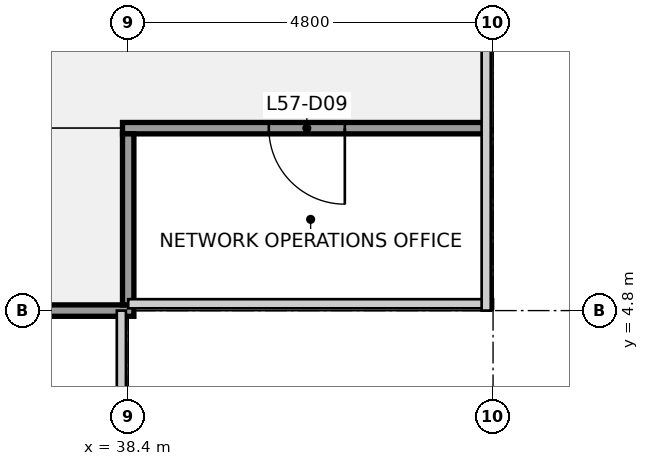
"""IFC4 building model, lengths in metres.
Left out: names, types, materials, properties, quantities, classifications, styles, units other than length and angle.
Written with IfcOpenShell. Run it as: python <this file> out.ifc"""

import sys

from ifc_helpers import new_model, si_unit, direction, frame, frame_2d, origin, place, context, subcontext, project, spatial, rectangle, extrude, element, fill, save


model = new_model("IFC4")
c1 = context("Model", 3, precision=1e-05, world=origin(), true_north=direction((0.0, 1.0)))
c2 = subcontext(c1, "Body", "Model", "MODEL_VIEW")
j1 = project(units=[si_unit("LENGTHUNIT", "METRE"), si_unit("PLANEANGLEUNIT", "RADIAN")], contexts=[c1])
p1 = place(None, origin())
s1 = spatial("IfcSite", under=j1, at=p1, CompositionType="ELEMENT")
p2 = place(p1, origin())
s2 = spatial("IfcBuilding", under=s1, at=p2, CompositionType="ELEMENT")
p3 = place(p2, frame((0.0, 0.0, 257.2)))
s3 = spatial("IfcBuildingStorey", under=s2, at=p3, CompositionType="ELEMENT", Elevation=257.2)
p4 = place(p3, frame((19.125, 4.8, 0.0), z_axis=(0.0, 0.0, 1.0), x_axis=(1.0, 0.0, 0.0)))
e1 = element("IfcWall", 1, at=p4, inside=s3, PredefinedType="PARTITIONING", context=c2, shape_type="SweptSolid", body=[
    extrude(rectangle(XDim=19.35, YDim=0.15, at=frame_2d((9.675, 0.0))), origin(), (0.0, 0.0, 1.0), 2.87),
])
p5 = place(p4, frame((0.775, 0.0, 0.0)))
e2 = element("IfcOpeningElement", 2, at=p5, cuts=e1, PredefinedType="OPENING", context=c2, shape_type="SweptSolid", body=[
    extrude(rectangle(XDim=1.0, YDim=2.1, at=frame_2d((0.5, 1.05))), frame((0.0, 0.085, 0.0), z_axis=(0.0, -1.0, 0.0), x_axis=(1.0, 0.0, 0.0)), (0.0, 0.0, 1.0), 0.17),
])
p6 = place(p4, frame((4.375, 0.0, 0.0)))
e3 = element("IfcOpeningElement", 3, at=p6, cuts=e1, PredefinedType="OPENING", context=c2, shape_type="SweptSolid", body=[
    extrude(rectangle(XDim=1.0, YDim=2.1, at=frame_2d((0.5, 1.05))), frame((0.0, 0.085, 0.0), z_axis=(0.0, -1.0, 0.0), x_axis=(1.0, 0.0, 0.0)), (0.0, 0.0, 1.0), 0.17),
])
p7 = place(p4, frame((7.975, 0.0, 0.0)))
e4 = element("IfcOpeningElement", 4, at=p7, cuts=e1, PredefinedType="OPENING", context=c2, shape_type="SweptSolid", body=[
    extrude(rectangle(XDim=1.0, YDim=2.1, at=frame_2d((0.5, 1.05))), frame((0.0, 0.085, 0.0), z_axis=(0.0, -1.0, 0.0), x_axis=(1.0, 0.0, 0.0)), (0.0, 0.0, 1.0), 0.17),
])
p8 = place(p4, frame((10.375, 0.0, 0.0)))
e5 = element("IfcOpeningElement", 5, at=p8, cuts=e1, PredefinedType="OPENING", context=c2, shape_type="SweptSolid", body=[
    extrude(rectangle(XDim=1.0, YDim=2.1, at=frame_2d((0.5, 1.05))), frame((0.0, 0.085, 0.0), z_axis=(0.0, -1.0, 0.0), x_axis=(1.0, 0.0, 0.0)), (0.0, 0.0, 1.0), 0.17),
])
p9 = place(p4, frame((15.175, 0.0, 0.0)))
e6 = element("IfcOpeningElement", 6, at=p9, cuts=e1, PredefinedType="OPENING", context=c2, shape_type="SweptSolid", body=[
    extrude(rectangle(XDim=1.0, YDim=2.1, at=frame_2d((0.5, 1.05))), frame((0.0, 0.085, 0.0), z_axis=(0.0, -1.0, 0.0), x_axis=(1.0, 0.0, 0.0)), (0.0, 0.0, 1.0), 0.17),
])
p10 = place(p3, frame((38.325, 7.2, 0.0), z_axis=(0.0, 0.0, 1.0), x_axis=(1.0, 0.0, 0.0)))
e7 = element("IfcWall", 7, at=p10, inside=s3, PredefinedType="PARTITIONING", context=c2, shape_type="SweptSolid", body=[
    extrude(rectangle(XDim=4.775, YDim=0.15, at=frame_2d((2.388, 0.0))), origin(), (0.0, 0.0, 1.0), 2.87),
])
p11 = place(p10, frame((1.925, 0.0, 0.0)))
e8 = element("IfcOpeningElement", 8, at=p11, cuts=e7, PredefinedType="OPENING", context=c2, shape_type="SweptSolid", body=[
    extrude(rectangle(XDim=1.0, YDim=2.1, at=frame_2d((0.5, 1.05))), frame((0.0, 0.085, 0.0), z_axis=(0.0, -1.0, 0.0), x_axis=(1.0, 0.0, 0.0)), (0.0, 0.0, 1.0), 0.17),
])
p12 = place(p3, frame((38.4, 4.875, 0.0), z_axis=(0.0, 0.0, 1.0), x_axis=(0.0, 1.0, 0.0)))
e9 = element("IfcWall", 9, at=p12, inside=s3, PredefinedType="PARTITIONING", context=c2, shape_type="SweptSolid", body=[
    extrude(rectangle(XDim=2.25, YDim=0.15, at=frame_2d((1.125, 0.0))), origin(), (0.0, 0.0, 1.0), 2.87),
])
p13 = place(p11, origin())
e10 = element("IfcDoor", 10, at=p13, inside=s3, OperationType="SINGLE_SWING_RIGHT", PredefinedType="DOOR", context=c2, shape_type="SweptSolid", body=[
    extrude(rectangle(XDim=1.0, YDim=2.1, at=frame_2d((0.5, 1.05))), frame((0.0, 0.025, 0.0), z_axis=(0.0, -1.0, 0.0), x_axis=(1.0, 0.0, 0.0)), (0.0, 0.0, 1.0), 0.05),
])
fill(e8, e10)
save(model, sys.argv[1])
